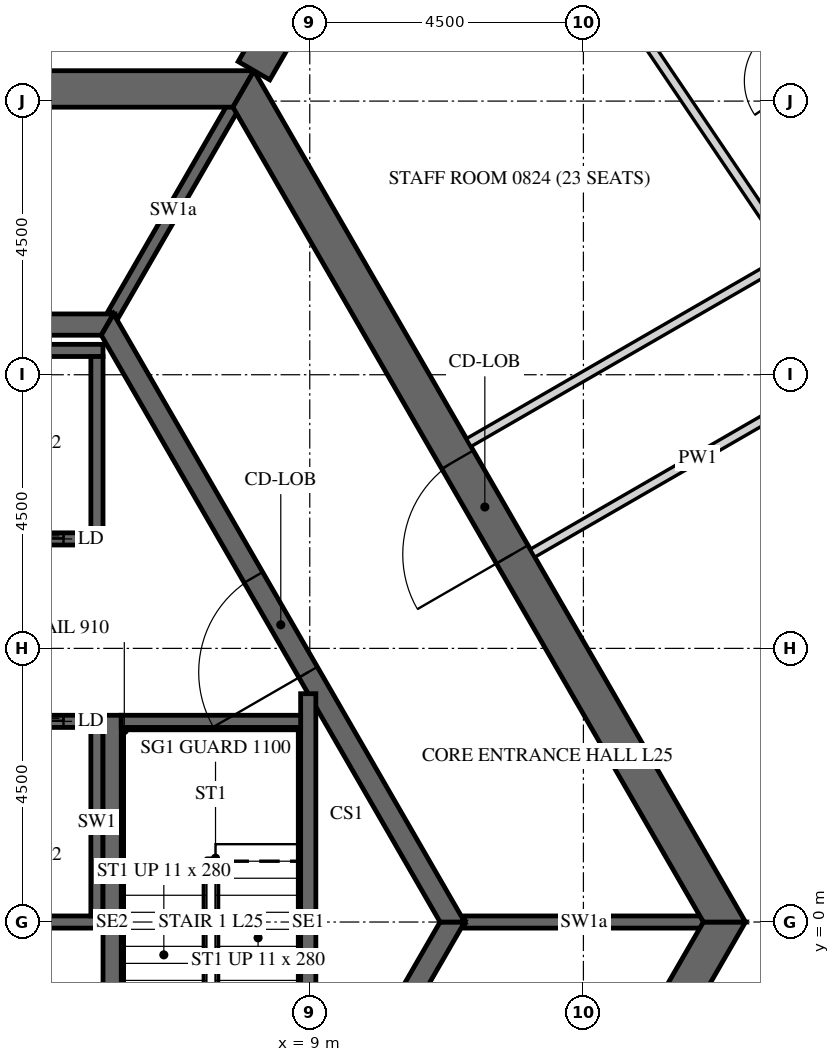
"""IFC4 building model, lengths in metres.
Left out: names, types, materials, properties, quantities, classifications, styles, units other than length and angle.
Written with IfcOpenShell. Run it as: python <this file> out.ifc"""

import sys

from ifc_helpers import new_model, si_unit, direction, frame, frame_2d, origin, place, context, subcontext, project, spatial, polyline, rectangle, outline, extrude, element, fill, save


model = new_model("IFC4")
c1 = context("Model", 3, precision=1e-05, world=origin(), true_north=direction((0.0, 1.0)))
c2 = subcontext(c1, "Body", "Model", "MODEL_VIEW")
j1 = project(units=[si_unit("LENGTHUNIT", "METRE"), si_unit("PLANEANGLEUNIT", "RADIAN")], contexts=[c1])
p1 = place(None, origin())
s1 = spatial("IfcSite", under=j1, at=p1, CompositionType="ELEMENT")
p2 = place(p1, origin())
s2 = spatial("IfcBuilding", under=s1, at=p2, CompositionType="ELEMENT")
p3 = place(p2, frame((0.0, 0.0, 111.6)))
s3 = spatial("IfcBuildingStorey", under=s2, at=p3, CompositionType="ELEMENT", Elevation=111.6)
p4 = place(p3, frame((7.91, -13.7, -0.15), z_axis=(0.0, 0.0, 1.0), x_axis=(0.499999880136, 0.866025472988, 0.0)))
e1 = element("IfcWall", 1, at=p4, inside=s3, PredefinedType="SHEAR", context=c2, shape_type="SweptSolid", body=[
    extrude(outline(polyline([(-0.173, -0.3), (15.993, -0.3), (15.646, 0.3), (0.173, 0.3), (-0.173, -0.3)])), origin(), (0.0, 0.0, 1.0), 3.9),
])
p5 = place(p4, frame((7.039, 0.0, 0.15)))
e2 = element("IfcOpeningElement", 2, at=p5, cuts=e1, PredefinedType="OPENING", context=c2, shape_type="SweptSolid", body=[
    extrude(rectangle(XDim=1.8, YDim=2.4, at=frame_2d((0.9, 1.2))), frame((0.0, 0.31, 0.0), z_axis=(0.0, -1.0, 0.0), x_axis=(1.0, 0.0, 0.0)), (0.0, 0.0, 1.0), 0.62),
])
p6 = place(p3, frame((15.819, 0.0, -0.15), z_axis=(0.0, 0.0, 1.0), x_axis=(-0.499999880136, 0.866025472988, 0.0)))
e3 = element("IfcWall", 3, at=p6, inside=s3, PredefinedType="SHEAR", context=c2, shape_type="SweptSolid", body=[
    extrude(outline(polyline([(-0.173, -0.3), (15.993, -0.3), (15.646, 0.3), (0.173, 0.3), (-0.173, -0.3)])), origin(), (0.0, 0.0, 1.0), 3.9),
])
p7 = place(p6, frame((6.981, 0.0, 0.15)))
e4 = element("IfcOpeningElement", 4, at=p7, cuts=e3, PredefinedType="OPENING", context=c2, shape_type="SweptSolid", body=[
    extrude(rectangle(XDim=1.8, YDim=2.4, at=frame_2d((0.9, 1.2))), frame((0.0, 0.31, 0.0), z_axis=(0.0, -1.0, 0.0), x_axis=(1.0, 0.0, 0.0)), (0.0, 0.0, 1.0), 0.62),
])
p8 = place(p3, frame((7.91, 13.7, -0.15), z_axis=(0.0, 0.0, 1.0), x_axis=(-1.0, 0.0, 0.0)))
e5 = element("IfcWall", 5, at=p8, inside=s3, PredefinedType="SHEAR", context=c2, shape_type="SweptSolid", body=[
    extrude(outline(polyline([(-0.173, -0.3), (15.993, -0.3), (15.646, 0.3), (0.173, 0.3), (-0.173, -0.3)])), origin(), (0.0, 0.0, 1.0), 3.9),
])
p9 = place(p8, frame((7.31, 0.0, 0.15)))
e6 = element("IfcOpeningElement", 6, at=p9, cuts=e5, PredefinedType="OPENING", context=c2, shape_type="SweptSolid", body=[
    extrude(rectangle(XDim=1.2, YDim=2.4, at=frame_2d((0.6, 1.2))), frame((0.0, 0.31, 0.0), z_axis=(0.0, -1.0, 0.0), x_axis=(1.0, 0.0, 0.0)), (0.0, 0.0, 1.0), 0.62),
])
p10 = place(p3, frame((8.083, 14.0, -0.15), z_axis=(0.0, 0.0, 1.0), x_axis=(0.499997680643, 0.866026742862, 0.0)))
e7 = element("IfcWall", 7, at=p10, inside=s3, PredefinedType="SHEAR", context=c2, shape_type="SweptSolid", body=[
    extrude(rectangle(XDim=16.509, YDim=0.6, at=frame_2d((8.254, 0.0))), origin(), (0.0, 0.0, 1.0), 3.9),
])
p11 = place(p10, frame((7.354, 0.0, 0.15)))
e8 = element("IfcOpeningElement", 8, at=p11, cuts=e7, PredefinedType="OPENING", context=c2, shape_type="SweptSolid", body=[
    extrude(rectangle(XDim=1.8, YDim=2.4, at=frame_2d((0.9, 1.2))), frame((0.0, 0.31, 0.0), z_axis=(0.0, -1.0, 0.0), x_axis=(1.0, 0.0, 0.0)), (0.0, 0.0, 1.0), 0.62),
])
p12 = place(p3, frame((5.673, -9.825, -0.15), z_axis=(0.0, 0.0, 1.0), x_axis=(0.499995046907, 0.866028263435, 0.0)))
e9 = element("IfcWall", 9, at=p12, inside=s3, PredefinedType="SHEAR", context=c2, shape_type="SweptSolid", body=[
    extrude(outline(polyline([(-0.101, -0.175), (11.446, -0.175), (11.244, 0.175), (0.101, 0.175), (-0.101, -0.175)])), origin(), (0.0, 0.0, 1.0), 3.9),
])
p13 = place(p12, frame((4.801, 0.0, 0.15)))
e10 = element("IfcOpeningElement", 10, at=p13, cuts=e9, PredefinedType="OPENING", context=c2, shape_type="SweptSolid", body=[
    extrude(rectangle(XDim=1.8, YDim=2.4, at=frame_2d((0.9, 1.2))), frame((0.0, 0.185, 0.0), z_axis=(0.0, -1.0, 0.0), x_axis=(1.0, 0.0, 0.0)), (0.0, 0.0, 1.0), 0.37),
])
p14 = place(p3, frame((11.345, 0.0, -0.15), z_axis=(0.0, 0.0, 1.0), x_axis=(-0.499995046907, 0.866028263435, 0.0)))
e11 = element("IfcWall", 11, at=p14, inside=s3, PredefinedType="SHEAR", context=c2, shape_type="SweptSolid", body=[
    extrude(outline(polyline([(-0.101, -0.175), (11.446, -0.175), (11.244, 0.175), (0.101, 0.175), (-0.101, -0.175)])), origin(), (0.0, 0.0, 1.0), 3.9),
])
p15 = place(p14, frame((4.744, 0.0, 0.15)))
e12 = element("IfcOpeningElement", 12, at=p15, cuts=e11, PredefinedType="OPENING", context=c2, shape_type="SweptSolid", body=[
    extrude(rectangle(XDim=1.8, YDim=2.4, at=frame_2d((0.9, 1.2))), frame((0.0, 0.185, 0.0), z_axis=(0.0, -1.0, 0.0), x_axis=(1.0, 0.0, 0.0)), (0.0, 0.0, 1.0), 0.37),
])
p16 = place(p3, frame((5.673, 9.825, -0.15), z_axis=(0.0, 0.0, 1.0), x_axis=(-1.0, 0.0, 0.0)))
e13 = element("IfcWall", 13, at=p16, inside=s3, PredefinedType="SHEAR", context=c2, shape_type="SweptSolid", body=[
    extrude(outline(polyline([(-0.101, -0.175), (11.446, -0.175), (11.244, 0.175), (0.101, 0.175), (-0.101, -0.175)])), origin(), (0.0, 0.0, 1.0), 3.9),
])
p17 = place(p3, frame((-5.6, 6.3, -0.25), z_axis=(0.0, 0.0, 1.0), x_axis=(1.0, 0.0, 0.0)))
e14 = element("IfcWall", 14, at=p17, inside=s3, PredefinedType="SHEAR", context=c2, shape_type="SweptSolid", body=[
    extrude(rectangle(XDim=11.2, YDim=0.2, at=frame_2d((5.6, 0.0))), origin(), (0.0, 0.0, 1.0), 3.9),
])
p18 = place(p17, frame((0.65, 0.0, 0.25)))
e15 = element("IfcOpeningElement", 15, at=p18, cuts=e14, PredefinedType="OPENING", context=c2, shape_type="SweptSolid", body=[
    extrude(rectangle(XDim=1.1, YDim=2.1, at=frame_2d((0.55, 1.05))), frame((0.0, 0.11, 0.0), z_axis=(0.0, -1.0, 0.0), x_axis=(1.0, 0.0, 0.0)), (0.0, 0.0, 1.0), 0.22),
])
p19 = place(p17, frame((2.85, 0.0, 0.25)))
e16 = element("IfcOpeningElement", 16, at=p19, cuts=e14, PredefinedType="OPENING", context=c2, shape_type="SweptSolid", body=[
    extrude(rectangle(XDim=1.1, YDim=2.1, at=frame_2d((0.55, 1.05))), frame((0.0, 0.11, 0.0), z_axis=(0.0, -1.0, 0.0), x_axis=(1.0, 0.0, 0.0)), (0.0, 0.0, 1.0), 0.22),
])
p20 = place(p17, frame((5.05, 0.0, 0.25)))
e17 = element("IfcOpeningElement", 17, at=p20, cuts=e14, PredefinedType="OPENING", context=c2, shape_type="SweptSolid", body=[
    extrude(rectangle(XDim=1.1, YDim=2.1, at=frame_2d((0.55, 1.05))), frame((0.0, 0.11, 0.0), z_axis=(0.0, -1.0, 0.0), x_axis=(1.0, 0.0, 0.0)), (0.0, 0.0, 1.0), 0.22),
])
p21 = place(p17, frame((7.25, 0.0, 0.25)))
e18 = element("IfcOpeningElement", 18, at=p21, cuts=e14, PredefinedType="OPENING", context=c2, shape_type="SweptSolid", body=[
    extrude(rectangle(XDim=1.1, YDim=2.1, at=frame_2d((0.55, 1.05))), frame((0.0, 0.11, 0.0), z_axis=(0.0, -1.0, 0.0), x_axis=(1.0, 0.0, 0.0)), (0.0, 0.0, 1.0), 0.22),
])
p22 = place(p17, frame((9.45, 0.0, 0.25)))
e19 = element("IfcOpeningElement", 19, at=p22, cuts=e14, PredefinedType="OPENING", context=c2, shape_type="SweptSolid", body=[
    extrude(rectangle(XDim=1.1, YDim=2.1, at=frame_2d((0.55, 1.05))), frame((0.0, 0.11, 0.0), z_axis=(0.0, -1.0, 0.0), x_axis=(1.0, 0.0, 0.0)), (0.0, 0.0, 1.0), 0.22),
])
p23 = place(p3, frame((-5.6, 9.4, -0.25), z_axis=(0.0, 0.0, 1.0), x_axis=(1.0, 0.0, 0.0)))
e20 = element("IfcWall", 20, at=p23, inside=s3, PredefinedType="SHEAR", context=c2, shape_type="SweptSolid", body=[
    extrude(rectangle(XDim=11.2, YDim=0.2, at=frame_2d((5.6, 0.0))), origin(), (0.0, 0.0, 1.0), 3.9),
])
p24 = place(p3, frame((5.5, 6.4, -0.25), z_axis=(0.0, 0.0, 1.0), x_axis=(0.0, 1.0, 0.0)))
e21 = element("IfcWall", 21, at=p24, inside=s3, PredefinedType="SHEAR", context=c2, shape_type="SweptSolid", body=[
    extrude(rectangle(XDim=2.9, YDim=0.2, at=frame_2d((1.45, 0.0))), origin(), (0.0, 0.0, 1.0), 3.9),
])
p25 = place(p3, frame((-5.6, 3.3, -0.25), z_axis=(0.0, 0.0, 1.0), x_axis=(1.0, 0.0, 0.0)))
e22 = element("IfcWall", 22, at=p25, inside=s3, PredefinedType="SHEAR", context=c2, shape_type="SweptSolid", body=[
    extrude(rectangle(XDim=11.2, YDim=0.2, at=frame_2d((5.6, 0.0))), origin(), (0.0, 0.0, 1.0), 3.9),
])
p26 = place(p25, frame((0.65, 0.0, 0.25)))
e23 = element("IfcOpeningElement", 23, at=p26, cuts=e22, PredefinedType="OPENING", context=c2, shape_type="SweptSolid", body=[
    extrude(rectangle(XDim=1.1, YDim=2.1, at=frame_2d((0.55, 1.05))), frame((0.0, 0.11, 0.0), z_axis=(0.0, -1.0, 0.0), x_axis=(1.0, 0.0, 0.0)), (0.0, 0.0, 1.0), 0.22),
])
p27 = place(p25, frame((2.85, 0.0, 0.25)))
e24 = element("IfcOpeningElement", 24, at=p27, cuts=e22, PredefinedType="OPENING", context=c2, shape_type="SweptSolid", body=[
    extrude(rectangle(XDim=1.1, YDim=2.1, at=frame_2d((0.55, 1.05))), frame((0.0, 0.11, 0.0), z_axis=(0.0, -1.0, 0.0), x_axis=(1.0, 0.0, 0.0)), (0.0, 0.0, 1.0), 0.22),
])
p28 = place(p25, frame((5.05, 0.0, 0.25)))
e25 = element("IfcOpeningElement", 25, at=p28, cuts=e22, PredefinedType="OPENING", context=c2, shape_type="SweptSolid", body=[
    extrude(rectangle(XDim=1.1, YDim=2.1, at=frame_2d((0.55, 1.05))), frame((0.0, 0.11, 0.0), z_axis=(0.0, -1.0, 0.0), x_axis=(1.0, 0.0, 0.0)), (0.0, 0.0, 1.0), 0.22),
])
p29 = place(p25, frame((7.25, 0.0, 0.25)))
e26 = element("IfcOpeningElement", 26, at=p29, cuts=e22, PredefinedType="OPENING", context=c2, shape_type="SweptSolid", body=[
    extrude(rectangle(XDim=1.1, YDim=2.1, at=frame_2d((0.55, 1.05))), frame((0.0, 0.11, 0.0), z_axis=(0.0, -1.0, 0.0), x_axis=(1.0, 0.0, 0.0)), (0.0, 0.0, 1.0), 0.22),
])
p30 = place(p25, frame((9.45, 0.0, 0.25)))
e27 = element("IfcOpeningElement", 27, at=p30, cuts=e22, PredefinedType="OPENING", context=c2, shape_type="SweptSolid", body=[
    extrude(rectangle(XDim=1.1, YDim=2.1, at=frame_2d((0.55, 1.05))), frame((0.0, 0.11, 0.0), z_axis=(0.0, -1.0, 0.0), x_axis=(1.0, 0.0, 0.0)), (0.0, 0.0, 1.0), 0.22),
])
p31 = place(p3, frame((-5.6, 0.0, -0.25), z_axis=(0.0, 0.0, 1.0), x_axis=(1.0, 0.0, 0.0)))
e28 = element("IfcWall", 28, at=p31, inside=s3, PredefinedType="SHEAR", context=c2, shape_type="SweptSolid", body=[
    extrude(rectangle(XDim=11.2, YDim=0.2, at=frame_2d((5.6, 0.0))), origin(), (0.0, 0.0, 1.0), 3.9),
])
p32 = place(p3, frame((5.5, 0.1, -0.25), z_axis=(0.0, 0.0, 1.0), x_axis=(0.0, 1.0, 0.0)))
e29 = element("IfcWall", 29, at=p32, inside=s3, PredefinedType="SHEAR", context=c2, shape_type="SweptSolid", body=[
    extrude(rectangle(XDim=3.1, YDim=0.2, at=frame_2d((1.55, 0.0))), origin(), (0.0, 0.0, 1.0), 3.9),
])
p33 = place(p3, frame((11.547, 0.0, -0.15), z_axis=(0.0, 0.0, 1.0), x_axis=(1.0, 0.0, 0.0)))
e30 = element("IfcWall", 30, at=p33, inside=s3, PredefinedType="SHEAR", context=c2, shape_type="SweptSolid", body=[
    extrude(rectangle(XDim=3.926, YDim=0.2, at=frame_2d((1.963, 0.0))), origin(), (0.0, 0.0, 1.0), 3.9),
])
p34 = place(p3, frame((5.773, 10.0, -0.15), z_axis=(0.0, 0.0, 1.0), x_axis=(0.500038251005, 0.86600331843, 0.0)))
e31 = element("IfcWall", 31, at=p34, inside=s3, PredefinedType="SHEAR", context=c2, shape_type="SweptSolid", body=[
    extrude(rectangle(XDim=3.926, YDim=0.2, at=frame_2d((1.963, 0.0))), origin(), (0.0, 0.0, 1.0), 3.9),
])
p35 = place(p3, frame((5.75, -3.4, -0.25), z_axis=(0.0, 0.0, 1.0), x_axis=(0.0, 1.0, 0.0)))
e32 = element("IfcWall", 32, at=p35, inside=s3, PredefinedType="SHEAR", context=c2, shape_type="SweptSolid", body=[
    extrude(rectangle(XDim=6.8, YDim=0.3, at=frame_2d((3.4, 0.0))), origin(), (0.0, 0.0, 1.0), 3.9),
])
p36 = place(p3, frame((8.975, -3.755, -0.25), z_axis=(0.0, 0.0, 1.0), x_axis=(0.0, 1.0, 0.0)))
e33 = element("IfcWall", 33, at=p36, inside=s3, PredefinedType="SHEAR", context=c2, shape_type="SweptSolid", body=[
    extrude(rectangle(XDim=7.51, YDim=0.25, at=frame_2d((3.755, 0.0))), origin(), (0.0, 0.0, 1.0), 3.9),
])
p37 = place(p3, frame((5.9, 3.3, -0.25), z_axis=(0.0, 0.0, 1.0), x_axis=(1.0, 0.0, 0.0)))
e34 = element("IfcWall", 34, at=p37, inside=s3, PredefinedType="SHEAR", context=c2, shape_type="SweptSolid", body=[
    extrude(rectangle(XDim=2.95, YDim=0.2, at=frame_2d((1.475, 0.0))), origin(), (0.0, 0.0, 1.0), 3.9),
])
p38 = place(p3, frame((13.928, -19.775, 0.0), z_axis=(0.0, 0.0, 1.0), x_axis=(0.50000450071, 0.866022805283, 0.0)))
e35 = element("IfcWall", 35, at=p38, inside=s3, PredefinedType="PARTITIONING", context=c2, shape_type="SweptSolid", body=[
    extrude(rectangle(XDim=23.877, YDim=0.15, at=frame_2d((11.938, 0.0))), origin(), (0.0, 0.0, 1.0), 2.988),
])
p39 = place(p38, frame((3.843, 0.0, 0.0)))
e36 = element("IfcOpeningElement", 36, at=p39, cuts=e35, PredefinedType="OPENING", context=c2, shape_type="SweptSolid", body=[
    extrude(rectangle(XDim=1.0, YDim=2.1, at=frame_2d((0.5, 1.05))), frame((0.0, 0.085, 0.0), z_axis=(0.0, -1.0, 0.0), x_axis=(1.0, 0.0, 0.0)), (0.0, 0.0, 1.0), 0.17),
])
p40 = place(p38, frame((18.425, 0.0, 0.0)))
e37 = element("IfcOpeningElement", 37, at=p40, cuts=e35, PredefinedType="OPENING", context=c2, shape_type="SweptSolid", body=[
    extrude(rectangle(XDim=1.0, YDim=2.1, at=frame_2d((0.5, 1.05))), frame((0.0, 0.085, 0.0), z_axis=(0.0, -1.0, 0.0), x_axis=(1.0, 0.0, 0.0)), (0.0, 0.0, 1.0), 0.17),
])
p41 = place(p3, frame((25.821, 0.972, 0.0), z_axis=(0.0, 0.0, 1.0), x_axis=(-0.559192946342, 0.829037543638, 0.0)))
e38 = element("IfcWall", 38, at=p41, inside=s3, PredefinedType="PARTITIONING", context=c2, shape_type="SweptSolid", body=[
    extrude(rectangle(XDim=21.918, YDim=0.15, at=frame_2d((10.959, 0.0))), origin(), (0.0, 0.0, 1.0), 2.988),
])
p42 = place(p41, frame((6.969, 0.0, 0.0)))
e39 = element("IfcOpeningElement", 39, at=p42, cuts=e38, PredefinedType="OPENING", context=c2, shape_type="SweptSolid", body=[
    extrude(rectangle(XDim=1.0, YDim=2.1, at=frame_2d((0.5, 1.05))), frame((0.0, 0.085, 0.0), z_axis=(0.0, -1.0, 0.0), x_axis=(1.0, 0.0, 0.0)), (0.0, 0.0, 1.0), 0.17),
])
p43 = place(p41, frame((15.511, 0.0, 0.0)))
e40 = element("IfcOpeningElement", 40, at=p43, cuts=e38, PredefinedType="OPENING", context=c2, shape_type="SweptSolid", body=[
    extrude(rectangle(XDim=1.0, YDim=2.1, at=frame_2d((0.5, 1.05))), frame((0.0, 0.085, 0.0), z_axis=(0.0, -1.0, 0.0), x_axis=(1.0, 0.0, 0.0)), (0.0, 0.0, 1.0), 0.17),
])
p44 = place(p3, frame((12.664, 6.066, 0.0), z_axis=(0.0, 0.0, 1.0), x_axis=(0.866036561919, 0.499980673046, 0.0)))
e41 = element("IfcWall", 41, at=p44, inside=s3, PredefinedType="PARTITIONING", context=c2, shape_type="SweptSolid", body=[
    extrude(rectangle(XDim=6.275, YDim=0.15, at=frame_2d((3.137, 0.0))), origin(), (0.0, 0.0, 1.0), 2.988),
])
p45 = place(p3, frame((11.465, 19.037, 0.0), z_axis=(0.0, 0.0, 1.0), x_axis=(0.559196064773, -0.829035440221, 0.0)))
e42 = element("IfcWall", 42, at=p45, inside=s3, PredefinedType="PARTITIONING", context=c2, shape_type="SweptSolid", body=[
    extrude(rectangle(XDim=9.757, YDim=0.15, at=frame_2d((4.878, 0.0))), origin(), (0.0, 0.0, 1.0), 2.988),
])
p46 = place(p45, frame((4.428, 0.0, 0.0)))
e43 = element("IfcOpeningElement", 43, at=p46, cuts=e42, PredefinedType="OPENING", context=c2, shape_type="SweptSolid", body=[
    extrude(rectangle(XDim=0.9, YDim=2.1, at=frame_2d((0.45, 1.05))), frame((0.0, 0.085, 0.0), z_axis=(0.0, -1.0, 0.0), x_axis=(1.0, 0.0, 0.0)), (0.0, 0.0, 1.0), 0.17),
])
p47 = place(p3, frame((16.855, 10.911, 0.0), z_axis=(0.0, 0.0, 1.0), x_axis=(-0.866020343444, -0.500008764664, 0.0)))
e44 = element("IfcWall", 44, at=p47, inside=s3, PredefinedType="PARTITIONING", context=c2, shape_type="SweptSolid", body=[
    extrude(rectangle(XDim=6.053, YDim=0.15, at=frame_2d((3.026, 0.0))), origin(), (0.0, 0.0, 1.0), 2.988),
])
p48 = place(p7, origin())
e45 = element("IfcDoor", 45, at=p48, inside=s3, OperationType="DOUBLE_DOOR_SINGLE_SWING", PredefinedType="DOOR", context=c2, shape_type="SweptSolid", body=[
    extrude(rectangle(XDim=1.8, YDim=2.4, at=frame_2d((0.9, 1.2))), frame((0.0, 0.025, 0.0), z_axis=(0.0, -1.0, 0.0), x_axis=(1.0, 0.0, 0.0)), (0.0, 0.0, 1.0), 0.05),
])
fill(e4, e45)
p49 = place(p15, origin())
e46 = element("IfcDoor", 46, at=p49, inside=s3, OperationType="DOUBLE_DOOR_SINGLE_SWING", PredefinedType="DOOR", context=c2, shape_type="SweptSolid", body=[
    extrude(rectangle(XDim=1.8, YDim=2.4, at=frame_2d((0.9, 1.2))), frame((0.0, 0.025, 0.0), z_axis=(0.0, -1.0, 0.0), x_axis=(1.0, 0.0, 0.0)), (0.0, 0.0, 1.0), 0.05),
])
fill(e12, e46)
p50 = place(p22, origin())
e47 = element("IfcDoor", 47, at=p50, inside=s3, OperationType="SLIDING_TO_LEFT", PredefinedType="DOOR", context=c2, shape_type="SweptSolid", body=[
    extrude(rectangle(XDim=1.1, YDim=2.1, at=frame_2d((0.55, 1.05))), frame((0.0, 0.025, 0.0), z_axis=(0.0, -1.0, 0.0), x_axis=(1.0, 0.0, 0.0)), (0.0, 0.0, 1.0), 0.05),
])
fill(e19, e47)
p51 = place(p30, origin())
e48 = element("IfcDoor", 48, at=p51, inside=s3, OperationType="SLIDING_TO_LEFT", PredefinedType="DOOR", context=c2, shape_type="SweptSolid", body=[
    extrude(rectangle(XDim=1.1, YDim=2.1, at=frame_2d((0.55, 1.05))), frame((0.0, 0.025, 0.0), z_axis=(0.0, -1.0, 0.0), x_axis=(1.0, 0.0, 0.0)), (0.0, 0.0, 1.0), 0.05),
])
fill(e27, e48)
save(model, sys.argv[1])
